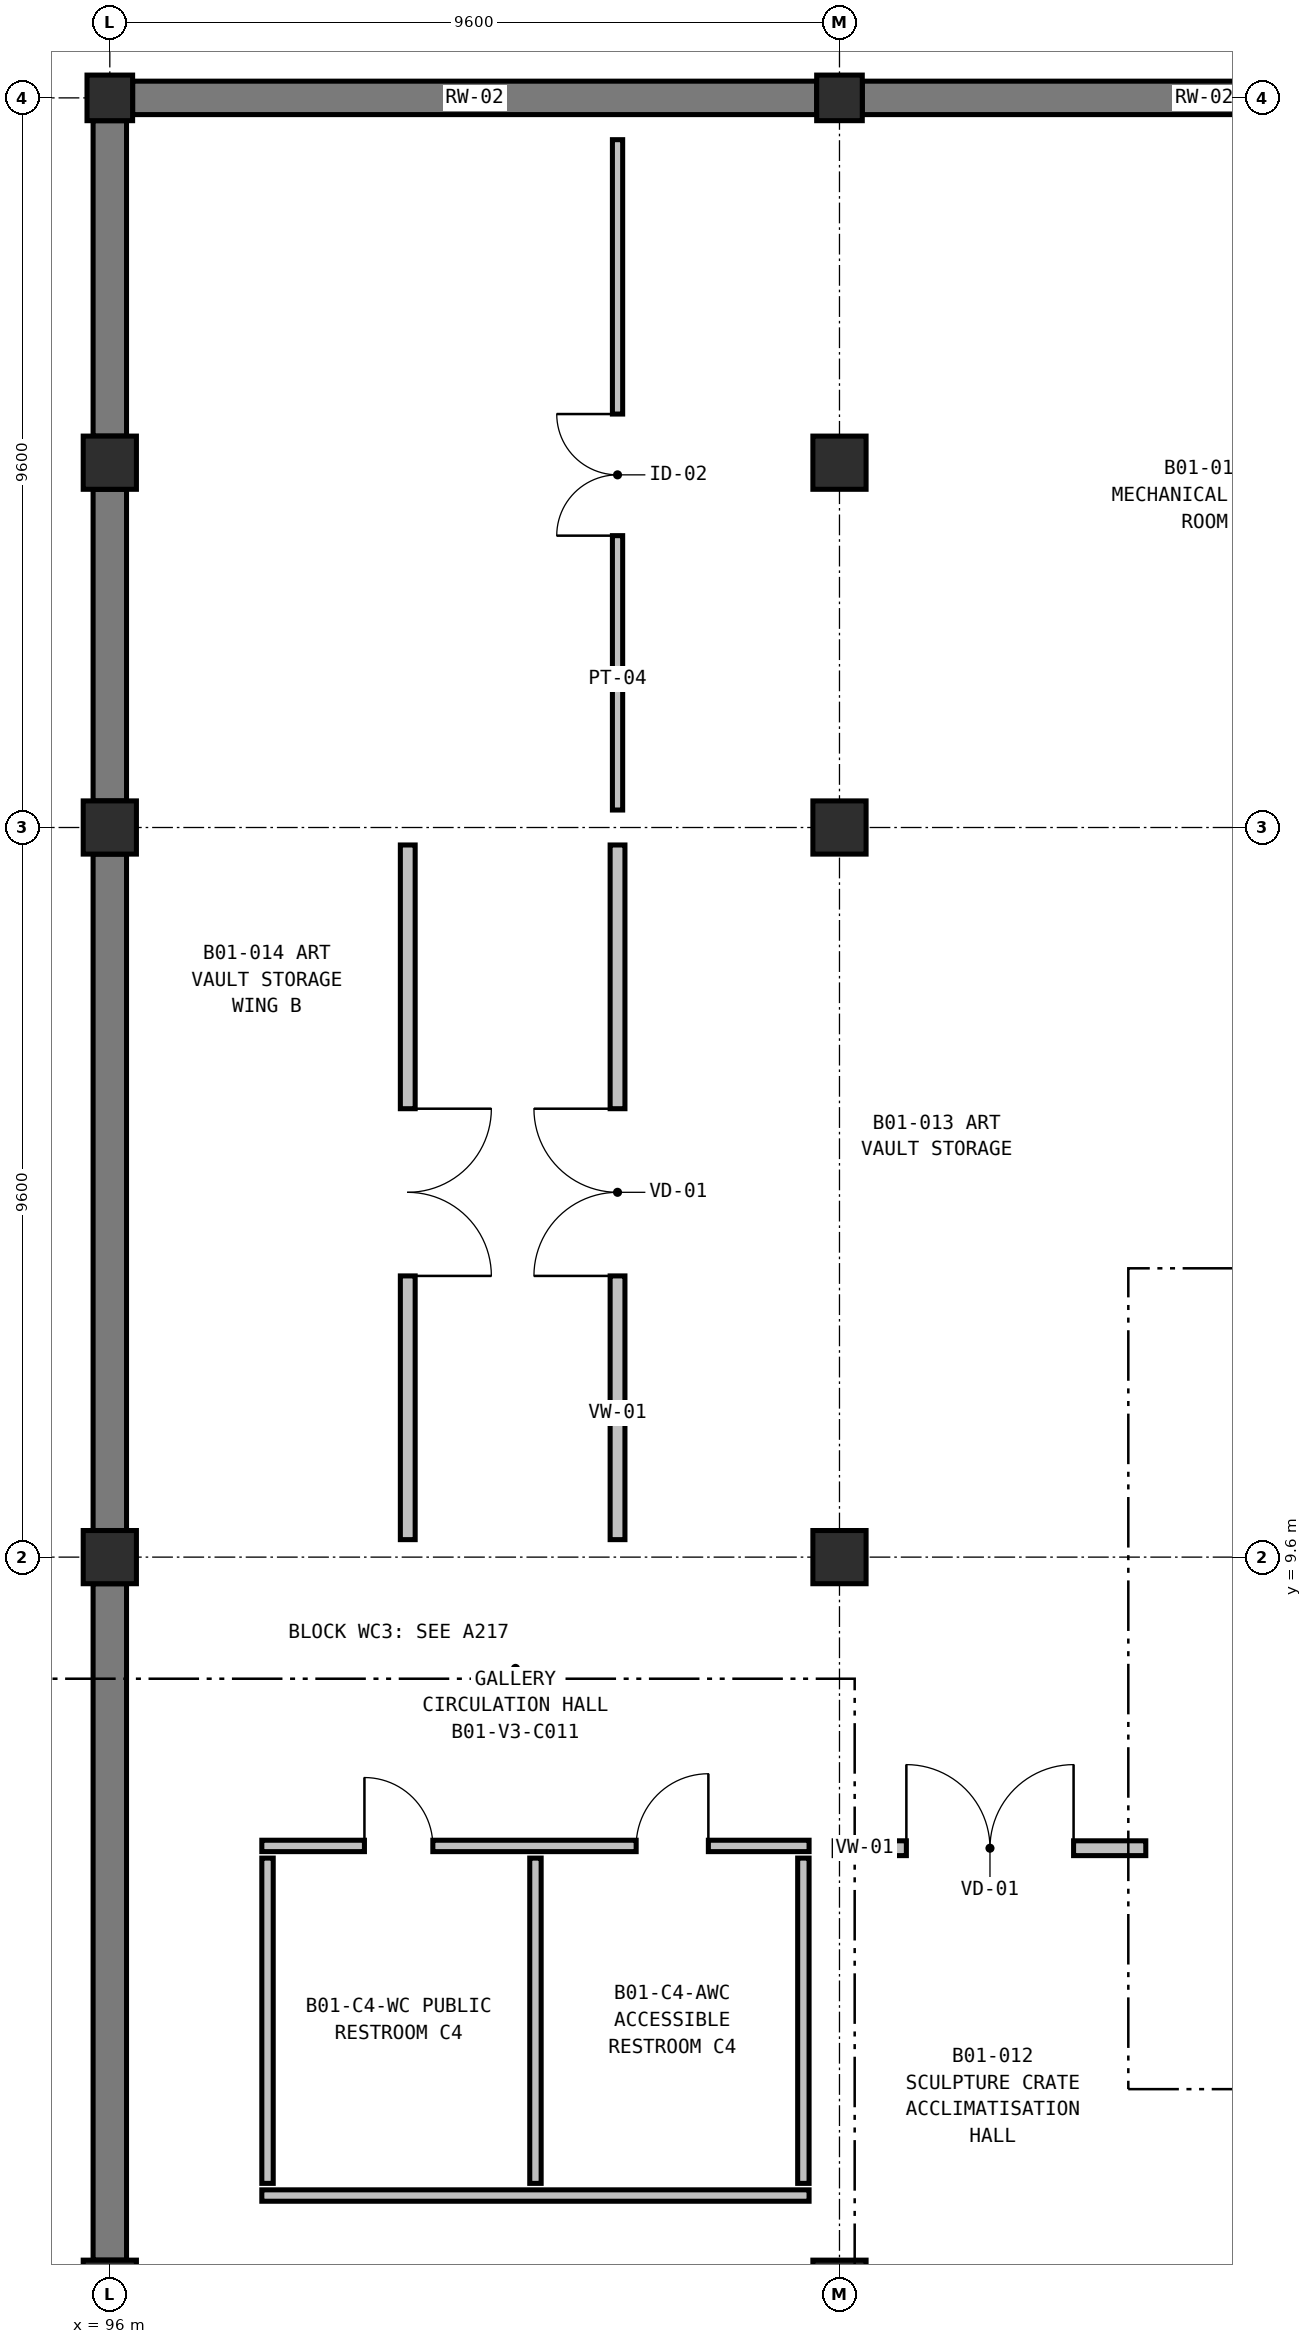
"""IFC4 building model, lengths in metres.
Left out: names, types, materials, properties, quantities, classifications, styles, units other than length and angle.
Written with IfcOpenShell. Run it as: python <this file> out.ifc"""

import sys

from ifc_helpers import new_model, si_unit, direction, frame, frame_2d, origin, origin_2d, place, context, subcontext, project, spatial, rectangle, extrude, element, fill, save


model = new_model("IFC4")
c1 = context("Model", 3, precision=1e-05, world=origin(), true_north=direction((0.0, 1.0)))
c2 = subcontext(c1, "Body", "Model", "MODEL_VIEW")
j1 = project(units=[si_unit("LENGTHUNIT", "METRE"), si_unit("PLANEANGLEUNIT", "RADIAN")], contexts=[c1])
p1 = place(None, origin())
s1 = spatial("IfcSite", under=j1, at=p1, CompositionType="ELEMENT")
p2 = place(p1, origin())
s2 = spatial("IfcBuilding", under=s1, at=p2, CompositionType="ELEMENT")
p3 = place(p2, frame((0.0, 0.0, -5.4)))
s3 = spatial("IfcBuildingStorey", under=s2, at=p3, CompositionType="ELEMENT", Elevation=-5.4)
for number, where, z_axis, x_axis in (
    (1, (96.0, 0.0, 0.0), (0.0, 0.0, 1.0), (1.0, 0.0, 0.0)),
    (2, (96.0, 9.6, 0.0), (0.0, 0.0, 1.0), (1.0, 0.0, 0.0)),
    (3, (96.0, 19.2, 0.0), (0.0, 0.0, 1.0), (1.0, 0.0, 0.0)),
    (4, (96.0, 24.0, 0.0), (0.0, 0.0, 1.0), (1.0, 0.0, 0.0)),
):
    element("IfcColumn", number, at=place(p3, frame(where, z_axis=z_axis, x_axis=x_axis)), inside=s3, PredefinedType="COLUMN", context=c2, shape_type="SweptSolid", body=[
        extrude(rectangle(XDim=0.7, YDim=0.7, at=origin_2d()), origin(), (0.0, 0.0, 1.0), 5.4),
    ])
p4 = place(p3, frame((96.0, 28.8, 0.0), z_axis=(0.0, 0.0, 1.0), x_axis=(1.0, 0.0, 0.0)))
e5 = element("IfcColumn", 5, at=p4, inside=s3, PredefinedType="COLUMN", context=c2, shape_type="SweptSolid", body=[
    extrude(rectangle(XDim=0.6, YDim=0.6, at=origin_2d()), origin(), (0.0, 0.0, 1.0), 5.4),
])
for number, where, z_axis, x_axis in (
    (6, (105.6, 0.0, 0.0), (0.0, 0.0, 1.0), (1.0, 0.0, 0.0)),
    (7, (105.6, 9.6, 0.0), (0.0, 0.0, 1.0), (1.0, 0.0, 0.0)),
    (8, (105.6, 19.2, 0.0), (0.0, 0.0, 1.0), (1.0, 0.0, 0.0)),
    (9, (105.6, 24.0, 0.0), (0.0, 0.0, 1.0), (1.0, 0.0, 0.0)),
):
    element("IfcColumn", number, at=place(p3, frame(where, z_axis=z_axis, x_axis=x_axis)), inside=s3, PredefinedType="COLUMN", context=c2, shape_type="SweptSolid", body=[
        extrude(rectangle(XDim=0.7, YDim=0.7, at=origin_2d()), origin(), (0.0, 0.0, 1.0), 5.4),
    ])
p5 = place(p3, frame((105.6, 28.8, 0.0), z_axis=(0.0, 0.0, 1.0), x_axis=(1.0, 0.0, 0.0)))
e10 = element("IfcColumn", 10, at=p5, inside=s3, PredefinedType="COLUMN", context=c2, shape_type="SweptSolid", body=[
    extrude(rectangle(XDim=0.6, YDim=0.6, at=origin_2d()), origin(), (0.0, 0.0, 1.0), 5.4),
])
for number, where, z_axis, x_axis in (
    (11, (96.3, 28.8, 0.0), (0.0, 0.0, 1.0), (1.0, 0.0, 0.0)),
    (12, (105.9, 28.8, 0.0), (0.0, 0.0, 1.0), (1.0, 0.0, 0.0)),
):
    element("IfcWall", number, at=place(p3, frame(where, z_axis=z_axis, x_axis=x_axis)), inside=s3, PredefinedType="USERDEFINED", context=c2, shape_type="SweptSolid", body=[
        extrude(rectangle(XDim=9.0, YDim=0.44, at=frame_2d((4.5, 0.0))), origin(), (0.0, 0.0, 1.0), 5.06),
    ])
p6 = place(p3, frame((96.0, 0.35, 0.0), z_axis=(0.0, 0.0, 1.0), x_axis=(0.0, 1.0, 0.0)))
e13 = element("IfcWall", 13, at=p6, inside=s3, PredefinedType="USERDEFINED", context=c2, shape_type="SweptSolid", body=[
    extrude(rectangle(XDim=8.9, YDim=0.44, at=frame_2d((4.45, 0.0))), origin(), (0.0, 0.0, 1.0), 5.06),
])
p7 = place(p3, frame((96.0, 9.95, 0.0), z_axis=(0.0, 0.0, 1.0), x_axis=(0.0, 1.0, 0.0)))
e14 = element("IfcWall", 14, at=p7, inside=s3, PredefinedType="USERDEFINED", context=c2, shape_type="SweptSolid", body=[
    extrude(rectangle(XDim=8.9, YDim=0.44, at=frame_2d((4.45, 0.0))), origin(), (0.0, 0.0, 1.0), 5.06),
])
p8 = place(p3, frame((96.0, 19.55, 0.0), z_axis=(0.0, 0.0, 1.0), x_axis=(0.0, 1.0, 0.0)))
e15 = element("IfcWall", 15, at=p8, inside=s3, PredefinedType="USERDEFINED", context=c2, shape_type="SweptSolid", body=[
    extrude(rectangle(XDim=4.1, YDim=0.44, at=frame_2d((2.05, 0.0))), origin(), (0.0, 0.0, 1.0), 5.06),
])
p9 = place(p3, frame((96.0, 24.35, 0.0), z_axis=(0.0, 0.0, 1.0), x_axis=(0.0, 1.0, 0.0)))
e16 = element("IfcWall", 16, at=p9, inside=s3, PredefinedType="USERDEFINED", context=c2, shape_type="SweptSolid", body=[
    extrude(rectangle(XDim=4.15, YDim=0.44, at=frame_2d((2.075, 0.0))), origin(), (0.0, 0.0, 1.0), 5.06),
])
p10 = place(p3, frame((98.0, 5.8, 0.0), z_axis=(0.0, 0.0, 1.0), x_axis=(1.0, 0.0, 0.0)))
e17 = element("IfcWall", 17, at=p10, inside=s3, PredefinedType="PARTITIONING", context=c2, shape_type="SweptSolid", body=[
    extrude(rectangle(XDim=7.2, YDim=0.15, at=frame_2d((3.6, 0.0))), origin(), (0.0, 0.0, 1.0), 5.06),
])
p11 = place(p10, frame((1.35, 0.0, 0.0)))
e18 = element("IfcOpeningElement", 18, at=p11, cuts=e17, PredefinedType="OPENING", context=c2, shape_type="SweptSolid", body=[
    extrude(rectangle(XDim=0.9, YDim=2.1, at=frame_2d((0.45, 1.05))), frame((0.0, 0.085, 0.0), z_axis=(0.0, -1.0, 0.0), x_axis=(1.0, 0.0, 0.0)), (0.0, 0.0, 1.0), 0.17),
])
p12 = place(p10, frame((4.925, 0.0, 0.0)))
e19 = element("IfcOpeningElement", 19, at=p12, cuts=e17, PredefinedType="OPENING", context=c2, shape_type="SweptSolid", body=[
    extrude(rectangle(XDim=0.95, YDim=2.15, at=frame_2d((0.475, 1.075))), frame((0.0, 0.085, 0.0), z_axis=(0.0, -1.0, 0.0), x_axis=(1.0, 0.0, 0.0)), (0.0, 0.0, 1.0), 0.17),
])
p13 = place(p3, frame((98.0, 1.2, 0.0), z_axis=(0.0, 0.0, 1.0), x_axis=(1.0, 0.0, 0.0)))
e20 = element("IfcWall", 20, at=p13, inside=s3, PredefinedType="PARTITIONING", context=c2, shape_type="SweptSolid", body=[
    extrude(rectangle(XDim=7.2, YDim=0.15, at=frame_2d((3.6, 0.0))), origin(), (0.0, 0.0, 1.0), 5.06),
])
for number, where, z_axis, x_axis in (
    (21, (98.075, 1.36, 0.0), (0.0, 0.0, 1.0), (0.0, 1.0, 0.0)),
    (22, (101.6, 1.36, 0.0), (0.0, 0.0, 1.0), (0.0, 1.0, 0.0)),
    (23, (105.125, 1.36, 0.0), (0.0, 0.0, 1.0), (0.0, 1.0, 0.0)),
):
    element("IfcWall", number, at=place(p3, frame(where, z_axis=z_axis, x_axis=x_axis)), inside=s3, PredefinedType="PARTITIONING", context=c2, shape_type="SweptSolid", body=[
        extrude(rectangle(XDim=4.28, YDim=0.15, at=frame_2d((2.14, 0.0))), origin(), (0.0, 0.0, 1.0), 4.435),
    ])
p14 = place(p3, frame((105.53, 5.77, 0.0), z_axis=(0.0, 0.0, 1.0), x_axis=(1.0, 0.0, 0.0)))
e24 = element("IfcWall", 24, at=p14, inside=s3, PredefinedType="PARTITIONING", context=c2, shape_type="SweptSolid", body=[
    extrude(rectangle(XDim=4.1, YDim=0.195, at=frame_2d((2.05, 0.0))), origin(), (0.0, 0.0, 1.0), 4.235),
])
p15 = place(p14, frame((0.95, 0.0, 0.0)))
e25 = element("IfcOpeningElement", 25, at=p15, cuts=e24, PredefinedType="OPENING", context=c2, shape_type="SweptSolid", body=[
    extrude(rectangle(XDim=2.2, YDim=2.6, at=frame_2d((1.1, 1.3))), frame((0.0, 0.107, 0.0), z_axis=(0.0, -1.0, 0.0), x_axis=(1.0, 0.0, 0.0)), (0.0, 0.0, 1.0), 0.215),
])
p16 = place(p3, frame((102.68, 9.83, 0.0), z_axis=(0.0, 0.0, 1.0), x_axis=(0.0, 1.0, 0.0)))
e26 = element("IfcWall", 26, at=p16, inside=s3, PredefinedType="PARTITIONING", context=c2, shape_type="SweptSolid", body=[
    extrude(rectangle(XDim=9.14, YDim=0.195, at=frame_2d((4.57, 0.0))), origin(), (0.0, 0.0, 1.0), 4.285),
])
p17 = place(p16, frame((3.47, 0.0, 0.0)))
e27 = element("IfcOpeningElement", 27, at=p17, cuts=e26, PredefinedType="OPENING", context=c2, shape_type="SweptSolid", body=[
    extrude(rectangle(XDim=2.2, YDim=2.6, at=frame_2d((1.1, 1.3))), frame((0.0, 0.107, 0.0), z_axis=(0.0, -1.0, 0.0), x_axis=(1.0, 0.0, 0.0)), (0.0, 0.0, 1.0), 0.215),
])
p18 = place(p3, frame((99.92, 18.97, 0.0), z_axis=(0.0, 0.0, 1.0), x_axis=(0.0, -1.0, 0.0)))
e28 = element("IfcWall", 28, at=p18, inside=s3, PredefinedType="PARTITIONING", context=c2, shape_type="SweptSolid", body=[
    extrude(rectangle(XDim=9.14, YDim=0.195, at=frame_2d((4.57, 0.0))), origin(), (0.0, 0.0, 1.0), 4.285),
])
p19 = place(p18, frame((3.47, 0.0, 0.0)))
e29 = element("IfcOpeningElement", 29, at=p19, cuts=e28, PredefinedType="OPENING", context=c2, shape_type="SweptSolid", body=[
    extrude(rectangle(XDim=2.2, YDim=2.6, at=frame_2d((1.1, 1.3))), frame((0.0, 0.107, 0.0), z_axis=(0.0, -1.0, 0.0), x_axis=(1.0, 0.0, 0.0)), (0.0, 0.0, 1.0), 0.215),
])
p20 = place(p3, frame((102.68, 19.43, 0.0), z_axis=(0.0, 0.0, 1.0), x_axis=(0.0, 1.0, 0.0)))
e30 = element("IfcWall", 30, at=p20, inside=s3, PredefinedType="PARTITIONING", context=c2, shape_type="SweptSolid", body=[
    extrude(rectangle(XDim=8.82, YDim=0.135, at=frame_2d((4.41, 0.0))), origin(), (0.0, 0.0, 1.0), 4.285),
])
p21 = place(p20, frame((3.61, 0.0, 0.0)))
e31 = element("IfcOpeningElement", 31, at=p21, cuts=e30, PredefinedType="OPENING", context=c2, shape_type="SweptSolid", body=[
    extrude(rectangle(XDim=1.6, YDim=2.35, at=frame_2d((0.8, 1.175))), frame((0.0, 0.077, 0.0), z_axis=(0.0, -1.0, 0.0), x_axis=(1.0, 0.0, 0.0)), (0.0, 0.0, 1.0), 0.155),
])
p22 = place(p11, origin())
e32 = element("IfcDoor", 32, at=p22, inside=s3, OperationType="SINGLE_SWING_LEFT", PredefinedType="DOOR", context=c2, shape_type="SweptSolid", body=[
    extrude(rectangle(XDim=0.9, YDim=2.1, at=frame_2d((0.45, 1.05))), frame((0.0, 0.025, 0.0), z_axis=(0.0, -1.0, 0.0), x_axis=(1.0, 0.0, 0.0)), (0.0, 0.0, 1.0), 0.05),
])
fill(e18, e32)
p23 = place(p12, origin())
e33 = element("IfcDoor", 33, at=p23, inside=s3, OperationType="SINGLE_SWING_RIGHT", PredefinedType="DOOR", context=c2, shape_type="SweptSolid", body=[
    extrude(rectangle(XDim=0.95, YDim=2.15, at=frame_2d((0.475, 1.075))), frame((0.0, 0.025, 0.0), z_axis=(0.0, -1.0, 0.0), x_axis=(1.0, 0.0, 0.0)), (0.0, 0.0, 1.0), 0.05),
])
fill(e19, e33)
p24 = place(p15, origin())
e34 = element("IfcDoor", 34, at=p24, inside=s3, OperationType="DOUBLE_DOOR_SINGLE_SWING", PredefinedType="DOOR", context=c2, shape_type="SweptSolid", body=[
    extrude(rectangle(XDim=2.2, YDim=2.6, at=frame_2d((1.1, 1.3))), frame((0.0, 0.025, 0.0), z_axis=(0.0, -1.0, 0.0), x_axis=(1.0, 0.0, 0.0)), (0.0, 0.0, 1.0), 0.05),
])
fill(e25, e34)
p25 = place(p17, origin())
e35 = element("IfcDoor", 35, at=p25, inside=s3, OperationType="DOUBLE_DOOR_SINGLE_SWING", PredefinedType="DOOR", context=c2, shape_type="SweptSolid", body=[
    extrude(rectangle(XDim=2.2, YDim=2.6, at=frame_2d((1.1, 1.3))), frame((0.0, 0.025, 0.0), z_axis=(0.0, -1.0, 0.0), x_axis=(1.0, 0.0, 0.0)), (0.0, 0.0, 1.0), 0.05),
])
fill(e27, e35)
p26 = place(p19, origin())
e36 = element("IfcDoor", 36, at=p26, inside=s3, OperationType="DOUBLE_DOOR_SINGLE_SWING", PredefinedType="DOOR", context=c2, shape_type="SweptSolid", body=[
    extrude(rectangle(XDim=2.2, YDim=2.6, at=frame_2d((1.1, 1.3))), frame((0.0, 0.025, 0.0), z_axis=(0.0, -1.0, 0.0), x_axis=(1.0, 0.0, 0.0)), (0.0, 0.0, 1.0), 0.05),
])
fill(e29, e36)
p27 = place(p21, origin())
e37 = element("IfcDoor", 37, at=p27, inside=s3, OperationType="DOUBLE_DOOR_SINGLE_SWING", PredefinedType="DOOR", context=c2, shape_type="SweptSolid", body=[
    extrude(rectangle(XDim=1.6, YDim=2.35, at=frame_2d((0.8, 1.175))), frame((0.0, 0.025, 0.0), z_axis=(0.0, -1.0, 0.0), x_axis=(1.0, 0.0, 0.0)), (0.0, 0.0, 1.0), 0.05),
])
fill(e31, e37)
save(model, sys.argv[1])
